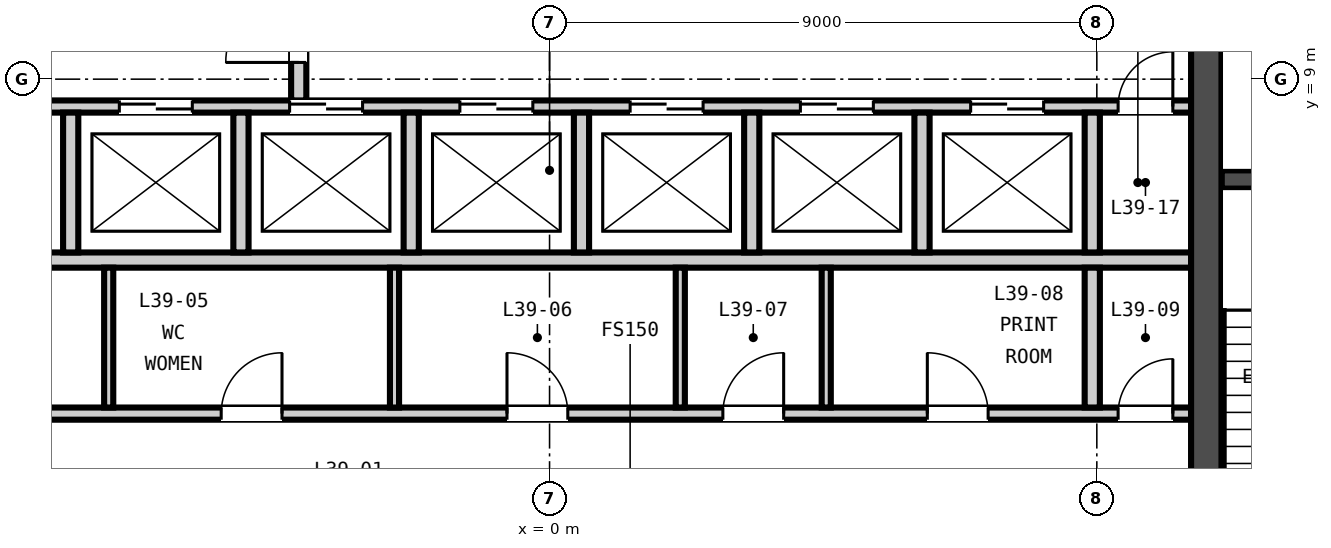
"""IFC4 building model, lengths in metres.
Left out: names, types, materials, properties, quantities, classifications, styles, units other than length and angle.
Written with IfcOpenShell. Run it as: python <this file> out.ifc"""

import sys

from ifc_helpers import new_model, si_unit, direction, frame, frame_2d, origin, place, context, subcontext, project, spatial, rectangle, extrude, element, fill, save


model = new_model("IFC4")
c1 = context("Model", 3, precision=1e-05, world=origin(), true_north=direction((0.0, 1.0)))
c2 = subcontext(c1, "Body", "Model", "MODEL_VIEW")
j1 = project(units=[si_unit("LENGTHUNIT", "METRE"), si_unit("PLANEANGLEUNIT", "RADIAN")], contexts=[c1])
p1 = place(None, origin())
s1 = spatial("IfcSite", under=j1, at=p1, CompositionType="ELEMENT")
p2 = place(p1, origin())
s2 = spatial("IfcBuilding", under=s1, at=p2, CompositionType="ELEMENT")
p3 = place(p2, frame((0.0, 0.0, 159.0)))
s3 = spatial("IfcBuildingStorey", under=s2, at=p3, CompositionType="ELEMENT", Elevation=159.0)
p4 = place(p3, frame((10.8, 0.8, -0.15), z_axis=(0.0, 0.0, 1.0), x_axis=(0.0, 1.0, 0.0)))
e1 = element("IfcWall", 1, at=p4, inside=s3, PredefinedType="SOLIDWALL", context=c2, shape_type="SweptSolid", body=[
    extrude(rectangle(XDim=13.4, YDim=0.5, at=frame_2d((6.7, 0.0))), origin(), (0.0, 0.0, 1.0), 3.65),
])
p5 = place(p3, frame((-10.55, 3.5, 0.0), z_axis=(0.0, 0.0, 1.0), x_axis=(1.0, 0.0, 0.0)))
e2 = element("IfcWall", 2, at=p5, inside=s3, PredefinedType="PARTITIONING", context=c2, shape_type="SweptSolid", body=[
    extrude(rectangle(XDim=21.1, YDim=0.2, at=frame_2d((10.55, 0.0))), origin(), (0.0, 0.0, 1.0), 3.5),
])
p6 = place(p5, frame((1.113, 0.0, 0.0)))
e3 = element("IfcOpeningElement", 3, at=p6, cuts=e2, PredefinedType="OPENING", context=c2, shape_type="SweptSolid", body=[
    extrude(rectangle(XDim=1.0, YDim=2.1, at=frame_2d((0.5, 1.05))), frame((0.0, 0.11, 0.0), z_axis=(0.0, -1.0, 0.0), x_axis=(1.0, 0.0, 0.0)), (0.0, 0.0, 1.0), 0.22),
])
p7 = place(p5, frame((5.15, 0.0, 0.0)))
e4 = element("IfcOpeningElement", 4, at=p7, cuts=e2, PredefinedType="OPENING", context=c2, shape_type="SweptSolid", body=[
    extrude(rectangle(XDim=1.0, YDim=2.1, at=frame_2d((0.5, 1.05))), frame((0.0, 0.11, 0.0), z_axis=(0.0, -1.0, 0.0), x_axis=(1.0, 0.0, 0.0)), (0.0, 0.0, 1.0), 0.22),
])
p8 = place(p5, frame((9.85, 0.0, 0.0)))
e5 = element("IfcOpeningElement", 5, at=p8, cuts=e2, PredefinedType="OPENING", context=c2, shape_type="SweptSolid", body=[
    extrude(rectangle(XDim=1.0, YDim=2.1, at=frame_2d((0.5, 1.05))), frame((0.0, 0.11, 0.0), z_axis=(0.0, -1.0, 0.0), x_axis=(1.0, 0.0, 0.0)), (0.0, 0.0, 1.0), 0.22),
])
p9 = place(p5, frame((13.4, 0.0, 0.0)))
e6 = element("IfcOpeningElement", 6, at=p9, cuts=e2, PredefinedType="OPENING", context=c2, shape_type="SweptSolid", body=[
    extrude(rectangle(XDim=1.0, YDim=2.1, at=frame_2d((0.5, 1.05))), frame((0.0, 0.11, 0.0), z_axis=(0.0, -1.0, 0.0), x_axis=(1.0, 0.0, 0.0)), (0.0, 0.0, 1.0), 0.22),
])
p10 = place(p5, frame((16.762, 0.0, 0.0)))
e7 = element("IfcOpeningElement", 7, at=p10, cuts=e2, PredefinedType="OPENING", context=c2, shape_type="SweptSolid", body=[
    extrude(rectangle(XDim=1.0, YDim=2.1, at=frame_2d((0.5, 1.05))), frame((0.0, 0.11, 0.0), z_axis=(0.0, -1.0, 0.0), x_axis=(1.0, 0.0, 0.0)), (0.0, 0.0, 1.0), 0.22),
])
p11 = place(p5, frame((19.9, 0.0, 0.0)))
e8 = element("IfcOpeningElement", 8, at=p11, cuts=e2, PredefinedType="OPENING", context=c2, shape_type="SweptSolid", body=[
    extrude(rectangle(XDim=0.9, YDim=2.1, at=frame_2d((0.45, 1.05))), frame((0.0, 0.11, 0.0), z_axis=(0.0, -1.0, 0.0), x_axis=(1.0, 0.0, 0.0)), (0.0, 0.0, 1.0), 0.22),
])
p12 = place(p3, frame((-10.55, 6.025, 0.0), z_axis=(0.0, 0.0, 1.0), x_axis=(1.0, 0.0, 0.0)))
e9 = element("IfcWall", 9, at=p12, inside=s3, PredefinedType="PARTITIONING", context=c2, shape_type="SweptSolid", body=[
    extrude(rectangle(XDim=21.1, YDim=0.25, at=frame_2d((10.55, 0.0))), origin(), (0.0, 0.0, 1.0), 3.5),
])
p13 = place(p3, frame((-10.55, 8.55, 0.0), z_axis=(0.0, 0.0, 1.0), x_axis=(1.0, 0.0, 0.0)))
e10 = element("IfcWall", 10, at=p13, inside=s3, PredefinedType="PARTITIONING", context=c2, shape_type="SweptSolid", body=[
    extrude(rectangle(XDim=21.1, YDim=0.2, at=frame_2d((10.55, 0.0))), origin(), (0.0, 0.0, 1.0), 3.5),
])
p14 = place(p13, frame((0.675, 0.0, 0.0)))
e11 = element("IfcOpeningElement", 11, at=p14, cuts=e10, PredefinedType="OPENING", context=c2, shape_type="SweptSolid", body=[
    extrude(rectangle(XDim=1.2, YDim=2.1, at=frame_2d((0.6, 1.05))), frame((0.0, 0.11, 0.0), z_axis=(0.0, -1.0, 0.0), x_axis=(1.0, 0.0, 0.0)), (0.0, 0.0, 1.0), 0.22),
])
p15 = place(p13, frame((3.475, 0.0, 0.0)))
e12 = element("IfcOpeningElement", 12, at=p15, cuts=e10, PredefinedType="OPENING", context=c2, shape_type="SweptSolid", body=[
    extrude(rectangle(XDim=1.2, YDim=2.1, at=frame_2d((0.6, 1.05))), frame((0.0, 0.11, 0.0), z_axis=(0.0, -1.0, 0.0), x_axis=(1.0, 0.0, 0.0)), (0.0, 0.0, 1.0), 0.22),
])
p16 = place(p13, frame((6.275, 0.0, 0.0)))
e13 = element("IfcOpeningElement", 13, at=p16, cuts=e10, PredefinedType="OPENING", context=c2, shape_type="SweptSolid", body=[
    extrude(rectangle(XDim=1.2, YDim=2.1, at=frame_2d((0.6, 1.05))), frame((0.0, 0.11, 0.0), z_axis=(0.0, -1.0, 0.0), x_axis=(1.0, 0.0, 0.0)), (0.0, 0.0, 1.0), 0.22),
])
p17 = place(p13, frame((9.075, 0.0, 0.0)))
e14 = element("IfcOpeningElement", 14, at=p17, cuts=e10, PredefinedType="OPENING", context=c2, shape_type="SweptSolid", body=[
    extrude(rectangle(XDim=1.2, YDim=2.1, at=frame_2d((0.6, 1.05))), frame((0.0, 0.11, 0.0), z_axis=(0.0, -1.0, 0.0), x_axis=(1.0, 0.0, 0.0)), (0.0, 0.0, 1.0), 0.22),
])
p18 = place(p13, frame((11.875, 0.0, 0.0)))
e15 = element("IfcOpeningElement", 15, at=p18, cuts=e10, PredefinedType="OPENING", context=c2, shape_type="SweptSolid", body=[
    extrude(rectangle(XDim=1.2, YDim=2.1, at=frame_2d((0.6, 1.05))), frame((0.0, 0.11, 0.0), z_axis=(0.0, -1.0, 0.0), x_axis=(1.0, 0.0, 0.0)), (0.0, 0.0, 1.0), 0.22),
])
p19 = place(p13, frame((14.675, 0.0, 0.0)))
e16 = element("IfcOpeningElement", 16, at=p19, cuts=e10, PredefinedType="OPENING", context=c2, shape_type="SweptSolid", body=[
    extrude(rectangle(XDim=1.2, YDim=2.1, at=frame_2d((0.6, 1.05))), frame((0.0, 0.11, 0.0), z_axis=(0.0, -1.0, 0.0), x_axis=(1.0, 0.0, 0.0)), (0.0, 0.0, 1.0), 0.22),
])
p20 = place(p13, frame((17.475, 0.0, 0.0)))
e17 = element("IfcOpeningElement", 17, at=p20, cuts=e10, PredefinedType="OPENING", context=c2, shape_type="SweptSolid", body=[
    extrude(rectangle(XDim=1.2, YDim=2.1, at=frame_2d((0.6, 1.05))), frame((0.0, 0.11, 0.0), z_axis=(0.0, -1.0, 0.0), x_axis=(1.0, 0.0, 0.0)), (0.0, 0.0, 1.0), 0.22),
])
p21 = place(p13, frame((19.9, 0.0, 0.0)))
e18 = element("IfcOpeningElement", 18, at=p21, cuts=e10, PredefinedType="OPENING", context=c2, shape_type="SweptSolid", body=[
    extrude(rectangle(XDim=0.9, YDim=2.1, at=frame_2d((0.45, 1.05))), frame((0.0, 0.11, 0.0), z_axis=(0.0, -1.0, 0.0), x_axis=(1.0, 0.0, 0.0)), (0.0, 0.0, 1.0), 0.22),
])
p22 = place(p3, frame((-4.125, 8.65, 0.0), z_axis=(0.0, 0.0, 1.0), x_axis=(0.0, 1.0, 0.0)))
e19 = element("IfcWall", 19, at=p22, inside=s3, PredefinedType="PARTITIONING", context=c2, shape_type="SweptSolid", body=[
    extrude(rectangle(XDim=2.45, YDim=0.25, at=frame_2d((1.225, 0.0))), origin(), (0.0, 0.0, 1.0), 3.5),
])
p23 = place(p22, frame((0.625, 0.0, 0.0)))
e20 = element("IfcOpeningElement", 20, at=p23, cuts=e19, PredefinedType="OPENING", context=c2, shape_type="SweptSolid", body=[
    extrude(rectangle(XDim=1.2, YDim=2.1, at=frame_2d((0.6, 1.05))), frame((0.0, 0.135, 0.0), z_axis=(0.0, -1.0, 0.0), x_axis=(1.0, 0.0, 0.0)), (0.0, 0.0, 1.0), 0.27),
])
for number, where, z_axis, x_axis in (
    (21, (-7.25, 3.6, 0.0), (0.0, 0.0, 1.0), (0.0, 1.0, 0.0)),
    (22, (-2.55, 3.6, 0.0), (0.0, 0.0, 1.0), (0.0, 1.0, 0.0)),
    (23, (2.15, 3.6, 0.0), (0.0, 0.0, 1.0), (0.0, 1.0, 0.0)),
    (24, (4.55, 3.6, 0.0), (0.0, 0.0, 1.0), (0.0, 1.0, 0.0)),
):
    element("IfcWall", number, at=place(p3, frame(where, z_axis=z_axis, x_axis=x_axis)), inside=s3, PredefinedType="PARTITIONING", context=c2, shape_type="SweptSolid", body=[
        extrude(rectangle(XDim=2.3, YDim=0.15, at=frame_2d((1.15, 0.0))), origin(), (0.0, 0.0, 1.0), 3.5),
    ])
p24 = place(p3, frame((8.925, 3.6, 0.0), z_axis=(0.0, 0.0, 1.0), x_axis=(0.0, 1.0, 0.0)))
e25 = element("IfcWall", 25, at=p24, inside=s3, PredefinedType="PARTITIONING", context=c2, shape_type="SweptSolid", body=[
    extrude(rectangle(XDim=2.3, YDim=0.25, at=frame_2d((1.15, 0.0))), origin(), (0.0, 0.0, 1.0), 3.5),
])
for number, where, z_axis, x_axis in (
    (26, (-7.875, 6.15, 0.0), (0.0, 0.0, 1.0), (0.0, 1.0, 0.0)),
    (27, (-5.075, 6.15, 0.0), (0.0, 0.0, 1.0), (0.0, 1.0, 0.0)),
    (28, (-2.275, 6.15, 0.0), (0.0, 0.0, 1.0), (0.0, 1.0, 0.0)),
    (29, (0.525, 6.15, 0.0), (0.0, 0.0, 1.0), (0.0, 1.0, 0.0)),
    (30, (3.325, 6.15, 0.0), (0.0, 0.0, 1.0), (0.0, 1.0, 0.0)),
    (31, (6.125, 6.15, 0.0), (0.0, 0.0, 1.0), (0.0, 1.0, 0.0)),
    (32, (8.925, 6.15, 0.0), (0.0, 0.0, 1.0), (0.0, 1.0, 0.0)),
):
    element("IfcWall", number, at=place(p3, frame(where, z_axis=z_axis, x_axis=x_axis)), inside=s3, PredefinedType="PARTITIONING", context=c2, shape_type="SweptSolid", body=[
        extrude(rectangle(XDim=2.3, YDim=0.25, at=frame_2d((1.15, 0.0))), origin(), (0.0, 0.0, 1.0), 3.5),
    ])
p25 = place(p3, frame((11.05, 7.35, 0.0), z_axis=(0.0, 0.0, 1.0), x_axis=(1.0, 0.0, 0.0)))
e33 = element("IfcWall", 33, at=p25, inside=s3, PredefinedType="SOLIDWALL", context=c2, shape_type="SweptSolid", body=[
    extrude(rectangle(XDim=2.95, YDim=0.3, at=frame_2d((1.475, 0.0))), origin(), (0.0, 0.0, 1.0), 3.5),
])
p26 = place(p23, origin())
e34 = element("IfcDoor", 34, at=p26, inside=s3, OperationType="SINGLE_SWING_LEFT", PredefinedType="DOOR", context=c2, shape_type="SweptSolid", body=[
    extrude(rectangle(XDim=1.2, YDim=2.1, at=frame_2d((0.6, 1.05))), frame((0.0, 0.025, 0.0), z_axis=(0.0, -1.0, 0.0), x_axis=(1.0, 0.0, 0.0)), (0.0, 0.0, 1.0), 0.05),
])
fill(e20, e34)
p27 = place(p7, origin())
e35 = element("IfcDoor", 35, at=p27, inside=s3, OperationType="SINGLE_SWING_RIGHT", PredefinedType="DOOR", context=c2, shape_type="SweptSolid", body=[
    extrude(rectangle(XDim=1.0, YDim=2.1, at=frame_2d((0.5, 1.05))), frame((0.0, 0.025, 0.0), z_axis=(0.0, -1.0, 0.0), x_axis=(1.0, 0.0, 0.0)), (0.0, 0.0, 1.0), 0.05),
])
fill(e4, e35)
p28 = place(p8, origin())
e36 = element("IfcDoor", 36, at=p28, inside=s3, OperationType="SINGLE_SWING_LEFT", PredefinedType="DOOR", context=c2, shape_type="SweptSolid", body=[
    extrude(rectangle(XDim=1.0, YDim=2.1, at=frame_2d((0.5, 1.05))), frame((0.0, 0.025, 0.0), z_axis=(0.0, -1.0, 0.0), x_axis=(1.0, 0.0, 0.0)), (0.0, 0.0, 1.0), 0.05),
])
fill(e5, e36)
p29 = place(p9, origin())
e37 = element("IfcDoor", 37, at=p29, inside=s3, OperationType="SINGLE_SWING_RIGHT", PredefinedType="DOOR", context=c2, shape_type="SweptSolid", body=[
    extrude(rectangle(XDim=1.0, YDim=2.1, at=frame_2d((0.5, 1.05))), frame((0.0, 0.025, 0.0), z_axis=(0.0, -1.0, 0.0), x_axis=(1.0, 0.0, 0.0)), (0.0, 0.0, 1.0), 0.05),
])
fill(e6, e37)
p30 = place(p10, origin())
e38 = element("IfcDoor", 38, at=p30, inside=s3, OperationType="SINGLE_SWING_LEFT", PredefinedType="DOOR", context=c2, shape_type="SweptSolid", body=[
    extrude(rectangle(XDim=1.0, YDim=2.1, at=frame_2d((0.5, 1.05))), frame((0.0, 0.025, 0.0), z_axis=(0.0, -1.0, 0.0), x_axis=(1.0, 0.0, 0.0)), (0.0, 0.0, 1.0), 0.05),
])
fill(e7, e38)
p31 = place(p11, origin())
e39 = element("IfcDoor", 39, at=p31, inside=s3, OperationType="SINGLE_SWING_RIGHT", PredefinedType="DOOR", context=c2, shape_type="SweptSolid", body=[
    extrude(rectangle(XDim=0.9, YDim=2.1, at=frame_2d((0.45, 1.05))), frame((0.0, 0.025, 0.0), z_axis=(0.0, -1.0, 0.0), x_axis=(1.0, 0.0, 0.0)), (0.0, 0.0, 1.0), 0.05),
])
fill(e8, e39)
p32 = place(p15, origin())
e40 = element("IfcDoor", 40, at=p32, inside=s3, OperationType="DOUBLE_DOOR_SLIDING", PredefinedType="DOOR", context=c2, shape_type="SweptSolid", body=[
    extrude(rectangle(XDim=1.2, YDim=2.1, at=frame_2d((0.6, 1.05))), frame((0.0, 0.025, 0.0), z_axis=(0.0, -1.0, 0.0), x_axis=(1.0, 0.0, 0.0)), (0.0, 0.0, 1.0), 0.05),
])
fill(e12, e40)
p33 = place(p16, origin())
e41 = element("IfcDoor", 41, at=p33, inside=s3, OperationType="DOUBLE_DOOR_SLIDING", PredefinedType="DOOR", context=c2, shape_type="SweptSolid", body=[
    extrude(rectangle(XDim=1.2, YDim=2.1, at=frame_2d((0.6, 1.05))), frame((0.0, 0.025, 0.0), z_axis=(0.0, -1.0, 0.0), x_axis=(1.0, 0.0, 0.0)), (0.0, 0.0, 1.0), 0.05),
])
fill(e13, e41)
p34 = place(p17, origin())
e42 = element("IfcDoor", 42, at=p34, inside=s3, OperationType="DOUBLE_DOOR_SLIDING", PredefinedType="DOOR", context=c2, shape_type="SweptSolid", body=[
    extrude(rectangle(XDim=1.2, YDim=2.1, at=frame_2d((0.6, 1.05))), frame((0.0, 0.025, 0.0), z_axis=(0.0, -1.0, 0.0), x_axis=(1.0, 0.0, 0.0)), (0.0, 0.0, 1.0), 0.05),
])
fill(e14, e42)
p35 = place(p18, origin())
e43 = element("IfcDoor", 43, at=p35, inside=s3, OperationType="DOUBLE_DOOR_SLIDING", PredefinedType="DOOR", context=c2, shape_type="SweptSolid", body=[
    extrude(rectangle(XDim=1.2, YDim=2.1, at=frame_2d((0.6, 1.05))), frame((0.0, 0.025, 0.0), z_axis=(0.0, -1.0, 0.0), x_axis=(1.0, 0.0, 0.0)), (0.0, 0.0, 1.0), 0.05),
])
fill(e15, e43)
p36 = place(p19, origin())
e44 = element("IfcDoor", 44, at=p36, inside=s3, OperationType="DOUBLE_DOOR_SLIDING", PredefinedType="DOOR", context=c2, shape_type="SweptSolid", body=[
    extrude(rectangle(XDim=1.2, YDim=2.1, at=frame_2d((0.6, 1.05))), frame((0.0, 0.025, 0.0), z_axis=(0.0, -1.0, 0.0), x_axis=(1.0, 0.0, 0.0)), (0.0, 0.0, 1.0), 0.05),
])
fill(e16, e44)
p37 = place(p20, origin())
e45 = element("IfcDoor", 45, at=p37, inside=s3, OperationType="DOUBLE_DOOR_SLIDING", PredefinedType="DOOR", context=c2, shape_type="SweptSolid", body=[
    extrude(rectangle(XDim=1.2, YDim=2.1, at=frame_2d((0.6, 1.05))), frame((0.0, 0.025, 0.0), z_axis=(0.0, -1.0, 0.0), x_axis=(1.0, 0.0, 0.0)), (0.0, 0.0, 1.0), 0.05),
])
fill(e17, e45)
p38 = place(p21, origin())
e46 = element("IfcDoor", 46, at=p38, inside=s3, OperationType="SINGLE_SWING_RIGHT", PredefinedType="DOOR", context=c2, shape_type="SweptSolid", body=[
    extrude(rectangle(XDim=0.9, YDim=2.1, at=frame_2d((0.45, 1.05))), frame((0.0, 0.025, 0.0), z_axis=(0.0, -1.0, 0.0), x_axis=(1.0, 0.0, 0.0)), (0.0, 0.0, 1.0), 0.05),
])
fill(e18, e46)
save(model, sys.argv[1])
